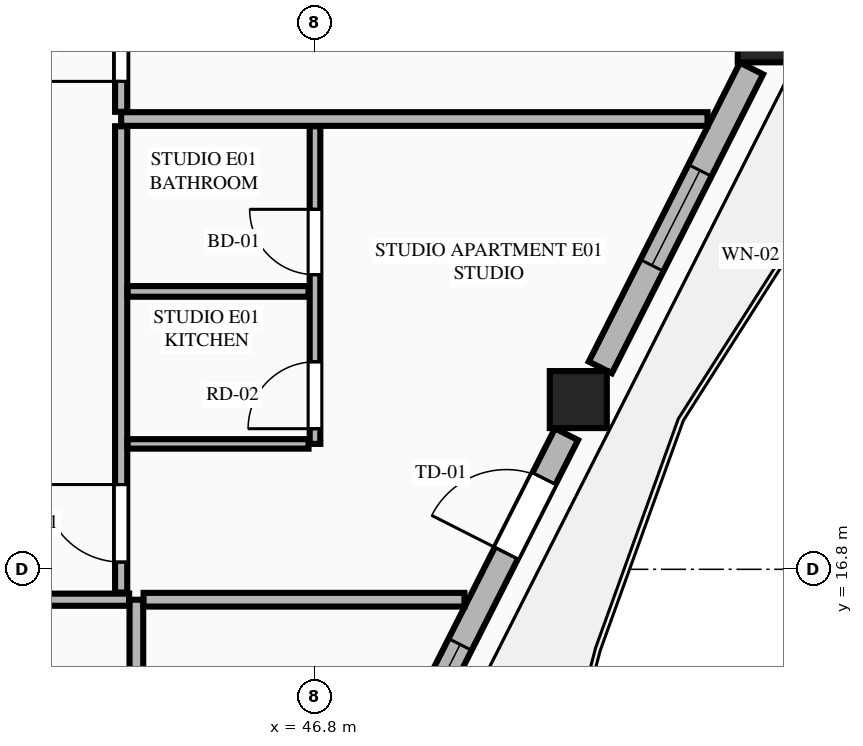
"""IFC4 building model, lengths in metres.
Left out: names, types, materials, properties, quantities, classifications, styles, units other than length and angle.
Written with IfcOpenShell. Run it as: python <this file> out.ifc"""

import sys

from ifc_helpers import new_model, si_unit, direction, frame, frame_2d, origin, origin_2d, place, context, subcontext, project, spatial, rectangle, extrude, element, fill, save


model = new_model("IFC4")
c1 = context("Model", 3, precision=1e-05, world=origin(), true_north=direction((0.0, 1.0)))
c2 = subcontext(c1, "Body", "Model", "MODEL_VIEW")
j1 = project(units=[si_unit("LENGTHUNIT", "METRE"), si_unit("PLANEANGLEUNIT", "RADIAN")], contexts=[c1])
p1 = place(None, origin())
s1 = spatial("IfcSite", under=j1, at=p1, CompositionType="ELEMENT")
p2 = place(p1, origin())
s2 = spatial("IfcBuilding", under=s1, at=p2, CompositionType="ELEMENT")
p3 = place(p2, frame((0.0, 0.0, 252.55)))
s3 = spatial("IfcBuildingStorey", under=s2, at=p3, CompositionType="ELEMENT", Elevation=252.55)
for number, where, z_axis, x_axis in (
    (1, (50.264, 19.033, 0.0), (0.0, 0.0, 1.0), (1.0, 0.0, 0.0)),
    (2, (52.737, 23.845, 0.0), (0.0, 0.0, 1.0), (1.0, 0.0, 0.0)),
):
    element("IfcColumn", number, at=place(p3, frame(where, z_axis=z_axis, x_axis=x_axis)), inside=s3, PredefinedType="COLUMN", context=c2, shape_type="SweptSolid", body=[
        extrude(rectangle(XDim=0.75, YDim=0.75, at=origin_2d()), origin(), (0.0, 0.0, 1.0), 3.65),
    ])
p4 = place(p3, frame((48.032, 14.473, 0.0), z_axis=(0.0, 0.0, 1.0), x_axis=(0.451539564999, 0.892251097641, 0.0)))
e3 = element("IfcWall", 3, at=p4, inside=s3, PredefinedType="STANDARD", context=c2, shape_type="SweptSolid", body=[
    extrude(rectangle(XDim=4.6, YDim=0.34, at=frame_2d((2.3, 0.0))), origin(), (0.0, 0.0, 1.0), 2.983),
])
p5 = place(p4, frame((2.846, 0.0, 0.0)))
e4 = element("IfcOpeningElement", 4, at=p5, cuts=e3, PredefinedType="OPENING", context=c2, shape_type="SweptSolid", body=[
    extrude(rectangle(XDim=1.1, YDim=2.25, at=frame_2d((0.55, 1.125))), frame((0.0, 0.18, 0.0), z_axis=(0.0, -1.0, 0.0), x_axis=(1.0, 0.0, 0.0)), (0.0, 0.0, 1.0), 0.36),
])
p6 = place(p4, frame((0.4, 0.0, 0.75)))
e5 = element("IfcOpeningElement", 5, at=p6, cuts=e3, PredefinedType="OPENING", context=c2, shape_type="SweptSolid", body=[
    extrude(rectangle(XDim=1.1, YDim=2.0, at=frame_2d((0.55, 1.0))), frame((0.0, 0.18, 0.0), z_axis=(0.0, -1.0, 0.0), x_axis=(1.0, 0.0, 0.0)), (0.0, 0.0, 1.0), 0.36),
])
p7 = place(p3, frame((50.554, 19.456, 0.0), z_axis=(0.0, 0.0, 1.0), x_axis=(0.45130817501, 0.892368158984, 0.0)))
e6 = element("IfcWall", 6, at=p7, inside=s3, PredefinedType="STANDARD", context=c2, shape_type="SweptSolid", body=[
    extrude(rectangle(XDim=4.407, YDim=0.34, at=frame_2d((2.204, 0.0))), origin(), (0.0, 0.0, 1.0), 2.983),
])
p8 = place(p7, frame((1.504, 0.0, 0.75)))
e7 = element("IfcOpeningElement", 7, at=p8, cuts=e6, PredefinedType="OPENING", context=c2, shape_type="SweptSolid", body=[
    extrude(rectangle(XDim=1.4, YDim=2.05, at=frame_2d((0.7, 1.025))), frame((0.0, 0.18, 0.0), z_axis=(0.0, -1.0, 0.0), x_axis=(1.0, 0.0, 0.0)), (0.0, 0.0, 1.0), 0.36),
])
p9 = place(p3, frame((44.45, 8.119, 0.0), z_axis=(0.0, 0.0, 1.0), x_axis=(0.0, 1.0, 0.0)))
e8 = element("IfcWall", 8, at=p9, inside=s3, PredefinedType="PARTITIONING", context=c2, shape_type="SweptSolid", body=[
    extrude(rectangle(XDim=8.281, YDim=0.18, at=frame_2d((4.141, 0.0))), origin(), (0.0, 0.0, 1.0), 3.45),
])
p10 = place(p3, frame((20.445, 16.4, 0.0), z_axis=(0.0, 0.0, 1.0), x_axis=(1.0, 0.0, 0.0)))
e9 = element("IfcWall", 9, at=p10, inside=s3, PredefinedType="PARTITIONING", context=c2, shape_type="SweptSolid", body=[
    extrude(rectangle(XDim=23.91, YDim=0.16, at=frame_2d((11.955, 0.0))), origin(), (0.0, 0.0, 1.0), 3.45),
])
p11 = place(p10, frame((0.705, 0.0, 0.0)))
e10 = element("IfcOpeningElement", 10, at=p11, cuts=e9, PredefinedType="OPENING", context=c2, shape_type="SweptSolid", body=[
    extrude(rectangle(XDim=1.35, YDim=2.35, at=frame_2d((0.675, 1.175))), frame((0.0, 0.09, 0.0), z_axis=(0.0, -1.0, 0.0), x_axis=(1.0, 0.0, 0.0)), (0.0, 0.0, 1.0), 0.18),
])
p12 = place(p3, frame((44.545, 16.4, 0.0), z_axis=(0.0, 0.0, 1.0), x_axis=(1.0, 0.0, 0.0)))
e11 = element("IfcWall", 11, at=p12, inside=s3, PredefinedType="PARTITIONING", context=c2, shape_type="SweptSolid", body=[
    extrude(rectangle(XDim=4.221, YDim=0.18, at=frame_2d((2.111, 0.0))), origin(), (0.0, 0.0, 1.0), 3.45),
])
p13 = place(p3, frame((44.25, 16.495, 0.0), z_axis=(0.0, 0.0, 1.0), x_axis=(0.0, 1.0, 0.0)))
e12 = element("IfcWall", 12, at=p13, inside=s3, PredefinedType="PARTITIONING", context=c2, shape_type="SweptSolid", body=[
    extrude(rectangle(XDim=6.134, YDim=0.16, at=frame_2d((3.067, 0.0))), origin(), (0.0, 0.0, 1.0), 3.137),
])
p14 = place(p13, frame((0.4, 0.0, 0.0)))
e13 = element("IfcOpeningElement", 13, at=p14, cuts=e12, PredefinedType="OPENING", context=c2, shape_type="SweptSolid", body=[
    extrude(rectangle(XDim=1.02, YDim=2.25, at=frame_2d((0.51, 1.125))), frame((0.0, 0.09, 0.0), z_axis=(0.0, -1.0, 0.0), x_axis=(1.0, 0.0, 0.0)), (0.0, 0.0, 1.0), 0.18),
])
p15 = place(p3, frame((44.335, 18.45, 0.0), z_axis=(0.0, 0.0, 1.0), x_axis=(1.0, 0.0, 0.0)))
e14 = element("IfcWall", 14, at=p15, inside=s3, PredefinedType="PARTITIONING", context=c2, shape_type="SweptSolid", body=[
    extrude(rectangle(XDim=2.38, YDim=0.125, at=frame_2d((1.19, 0.0))), origin(), (0.0, 0.0, 1.0), 3.45),
])
p16 = place(p3, frame((46.8, 18.45, 0.0), z_axis=(0.0, 0.0, 1.0), x_axis=(0.0, 1.0, 0.0)))
e15 = element("IfcWall", 15, at=p16, inside=s3, PredefinedType="PLUMBINGWALL", context=c2, shape_type="SweptSolid", body=[
    extrude(rectangle(XDim=4.179, YDim=0.14, at=frame_2d((2.089, 0.0))), origin(), (0.0, 0.0, 1.0), 3.45),
])
p17 = place(p16, frame((2.226, 0.0, 0.0)))
e16 = element("IfcOpeningElement", 16, at=p17, cuts=e15, PredefinedType="OPENING", context=c2, shape_type="SweptSolid", body=[
    extrude(rectangle(XDim=0.86, YDim=2.1, at=frame_2d((0.43, 1.05))), frame((0.0, 0.08, 0.0), z_axis=(0.0, -1.0, 0.0), x_axis=(1.0, 0.0, 0.0)), (0.0, 0.0, 1.0), 0.16),
])
p18 = place(p16, frame((0.2, 0.0, 0.0)))
e17 = element("IfcOpeningElement", 17, at=p18, cuts=e15, PredefinedType="OPENING", context=c2, shape_type="SweptSolid", body=[
    extrude(rectangle(XDim=0.88, YDim=2.15, at=frame_2d((0.44, 1.075))), frame((0.0, 0.08, 0.0), z_axis=(0.0, -1.0, 0.0), x_axis=(1.0, 0.0, 0.0)), (0.0, 0.0, 1.0), 0.16),
])
p19 = place(p3, frame((44.335, 20.456, 0.0), z_axis=(0.0, 0.0, 1.0), x_axis=(1.0, 0.0, 0.0)))
e18 = element("IfcWall", 18, at=p19, inside=s3, PredefinedType="PLUMBINGWALL", context=c2, shape_type="SweptSolid", body=[
    extrude(rectangle(XDim=2.38, YDim=0.14, at=frame_2d((1.19, 0.0))), origin(), (0.0, 0.0, 1.0), 3.45),
])
p20 = place(p3, frame((44.25, 22.724, 0.0), z_axis=(0.0, 0.0, 1.0), x_axis=(1.0, 0.0, 0.0)))
e19 = element("IfcWall", 19, at=p20, inside=s3, PredefinedType="PARTITIONING", context=c2, shape_type="SweptSolid", body=[
    extrude(rectangle(XDim=7.714, YDim=0.18, at=frame_2d((3.857, 0.0))), origin(), (0.0, 0.0, 1.0), 3.45),
])
p21 = place(p3, frame((44.25, 22.819, 0.0), z_axis=(0.0, 0.0, 1.0), x_axis=(0.0, 1.0, 0.0)))
e20 = element("IfcWall", 20, at=p21, inside=s3, PredefinedType="PARTITIONING", context=c2, shape_type="SweptSolid", body=[
    extrude(rectangle(XDim=6.134, YDim=0.16, at=frame_2d((3.067, 0.0))), origin(), (0.0, 0.0, 1.0), 3.137),
])
p22 = place(p21, frame((0.4, 0.0, 0.0)))
e21 = element("IfcOpeningElement", 21, at=p22, cuts=e20, PredefinedType="OPENING", context=c2, shape_type="SweptSolid", body=[
    extrude(rectangle(XDim=1.02, YDim=2.25, at=frame_2d((0.51, 1.125))), frame((0.0, 0.09, 0.0), z_axis=(0.0, -1.0, 0.0), x_axis=(1.0, 0.0, 0.0)), (0.0, 0.0, 1.0), 0.18),
])
p23 = place(p5, origin())
e22 = element("IfcDoor", 22, at=p23, inside=s3, OperationType="SINGLE_SWING_LEFT", PredefinedType="DOOR", context=c2, shape_type="SweptSolid", body=[
    extrude(rectangle(XDim=1.1, YDim=2.25, at=frame_2d((0.55, 1.125))), frame((0.0, 0.025, 0.0), z_axis=(0.0, -1.0, 0.0), x_axis=(1.0, 0.0, 0.0)), (0.0, 0.0, 1.0), 0.05),
])
fill(e4, e22)
p24 = place(p8, origin())
e23 = element("IfcWindow", 23, at=p24, inside=s3, PartitioningType="SINGLE_PANEL", PredefinedType="WINDOW", context=c2, shape_type="SweptSolid", body=[
    extrude(rectangle(XDim=1.4, YDim=2.05, at=frame_2d((0.7, 1.025))), frame((0.0, 0.03, 0.0), z_axis=(0.0, -1.0, 0.0), x_axis=(1.0, 0.0, 0.0)), (0.0, 0.0, 1.0), 0.06),
])
fill(e7, e23)
p25 = place(p17, origin())
e24 = element("IfcDoor", 24, at=p25, inside=s3, OperationType="SINGLE_SWING_RIGHT", PredefinedType="DOOR", context=c2, shape_type="SweptSolid", body=[
    extrude(rectangle(XDim=0.86, YDim=2.1, at=frame_2d((0.43, 1.05))), frame((0.0, 0.025, 0.0), z_axis=(0.0, -1.0, 0.0), x_axis=(1.0, 0.0, 0.0)), (0.0, 0.0, 1.0), 0.05),
])
fill(e16, e24)
p26 = place(p14, origin())
e25 = element("IfcDoor", 25, at=p26, inside=s3, OperationType="SINGLE_SWING_RIGHT", PredefinedType="DOOR", context=c2, shape_type="SweptSolid", body=[
    extrude(rectangle(XDim=1.02, YDim=2.25, at=frame_2d((0.51, 1.125))), frame((0.0, 0.025, 0.0), z_axis=(0.0, -1.0, 0.0), x_axis=(1.0, 0.0, 0.0)), (0.0, 0.0, 1.0), 0.05),
])
fill(e13, e25)
p27 = place(p18, origin())
e26 = element("IfcDoor", 26, at=p27, inside=s3, OperationType="SINGLE_SWING_LEFT", PredefinedType="DOOR", context=c2, shape_type="SweptSolid", body=[
    extrude(rectangle(XDim=0.88, YDim=2.15, at=frame_2d((0.44, 1.075))), frame((0.0, 0.025, 0.0), z_axis=(0.0, -1.0, 0.0), x_axis=(1.0, 0.0, 0.0)), (0.0, 0.0, 1.0), 0.05),
])
fill(e17, e26)
p28 = place(p22, origin())
e27 = element("IfcDoor", 27, at=p28, inside=s3, OperationType="SINGLE_SWING_LEFT", PredefinedType="DOOR", context=c2, shape_type="SweptSolid", body=[
    extrude(rectangle(XDim=1.02, YDim=2.25, at=frame_2d((0.51, 1.125))), frame((0.0, 0.025, 0.0), z_axis=(0.0, -1.0, 0.0), x_axis=(1.0, 0.0, 0.0)), (0.0, 0.0, 1.0), 0.05),
])
fill(e21, e27)
p29 = place(p6, origin())
e28 = element("IfcWindow", 28, at=p29, inside=s3, PartitioningType="SINGLE_PANEL", PredefinedType="WINDOW", context=c2, shape_type="SweptSolid", body=[
    extrude(rectangle(XDim=1.1, YDim=2.0, at=frame_2d((0.55, 1.0))), frame((0.0, 0.03, 0.0), z_axis=(0.0, -1.0, 0.0), x_axis=(1.0, 0.0, 0.0)), (0.0, 0.0, 1.0), 0.06),
])
fill(e5, e28)
save(model, sys.argv[1])
